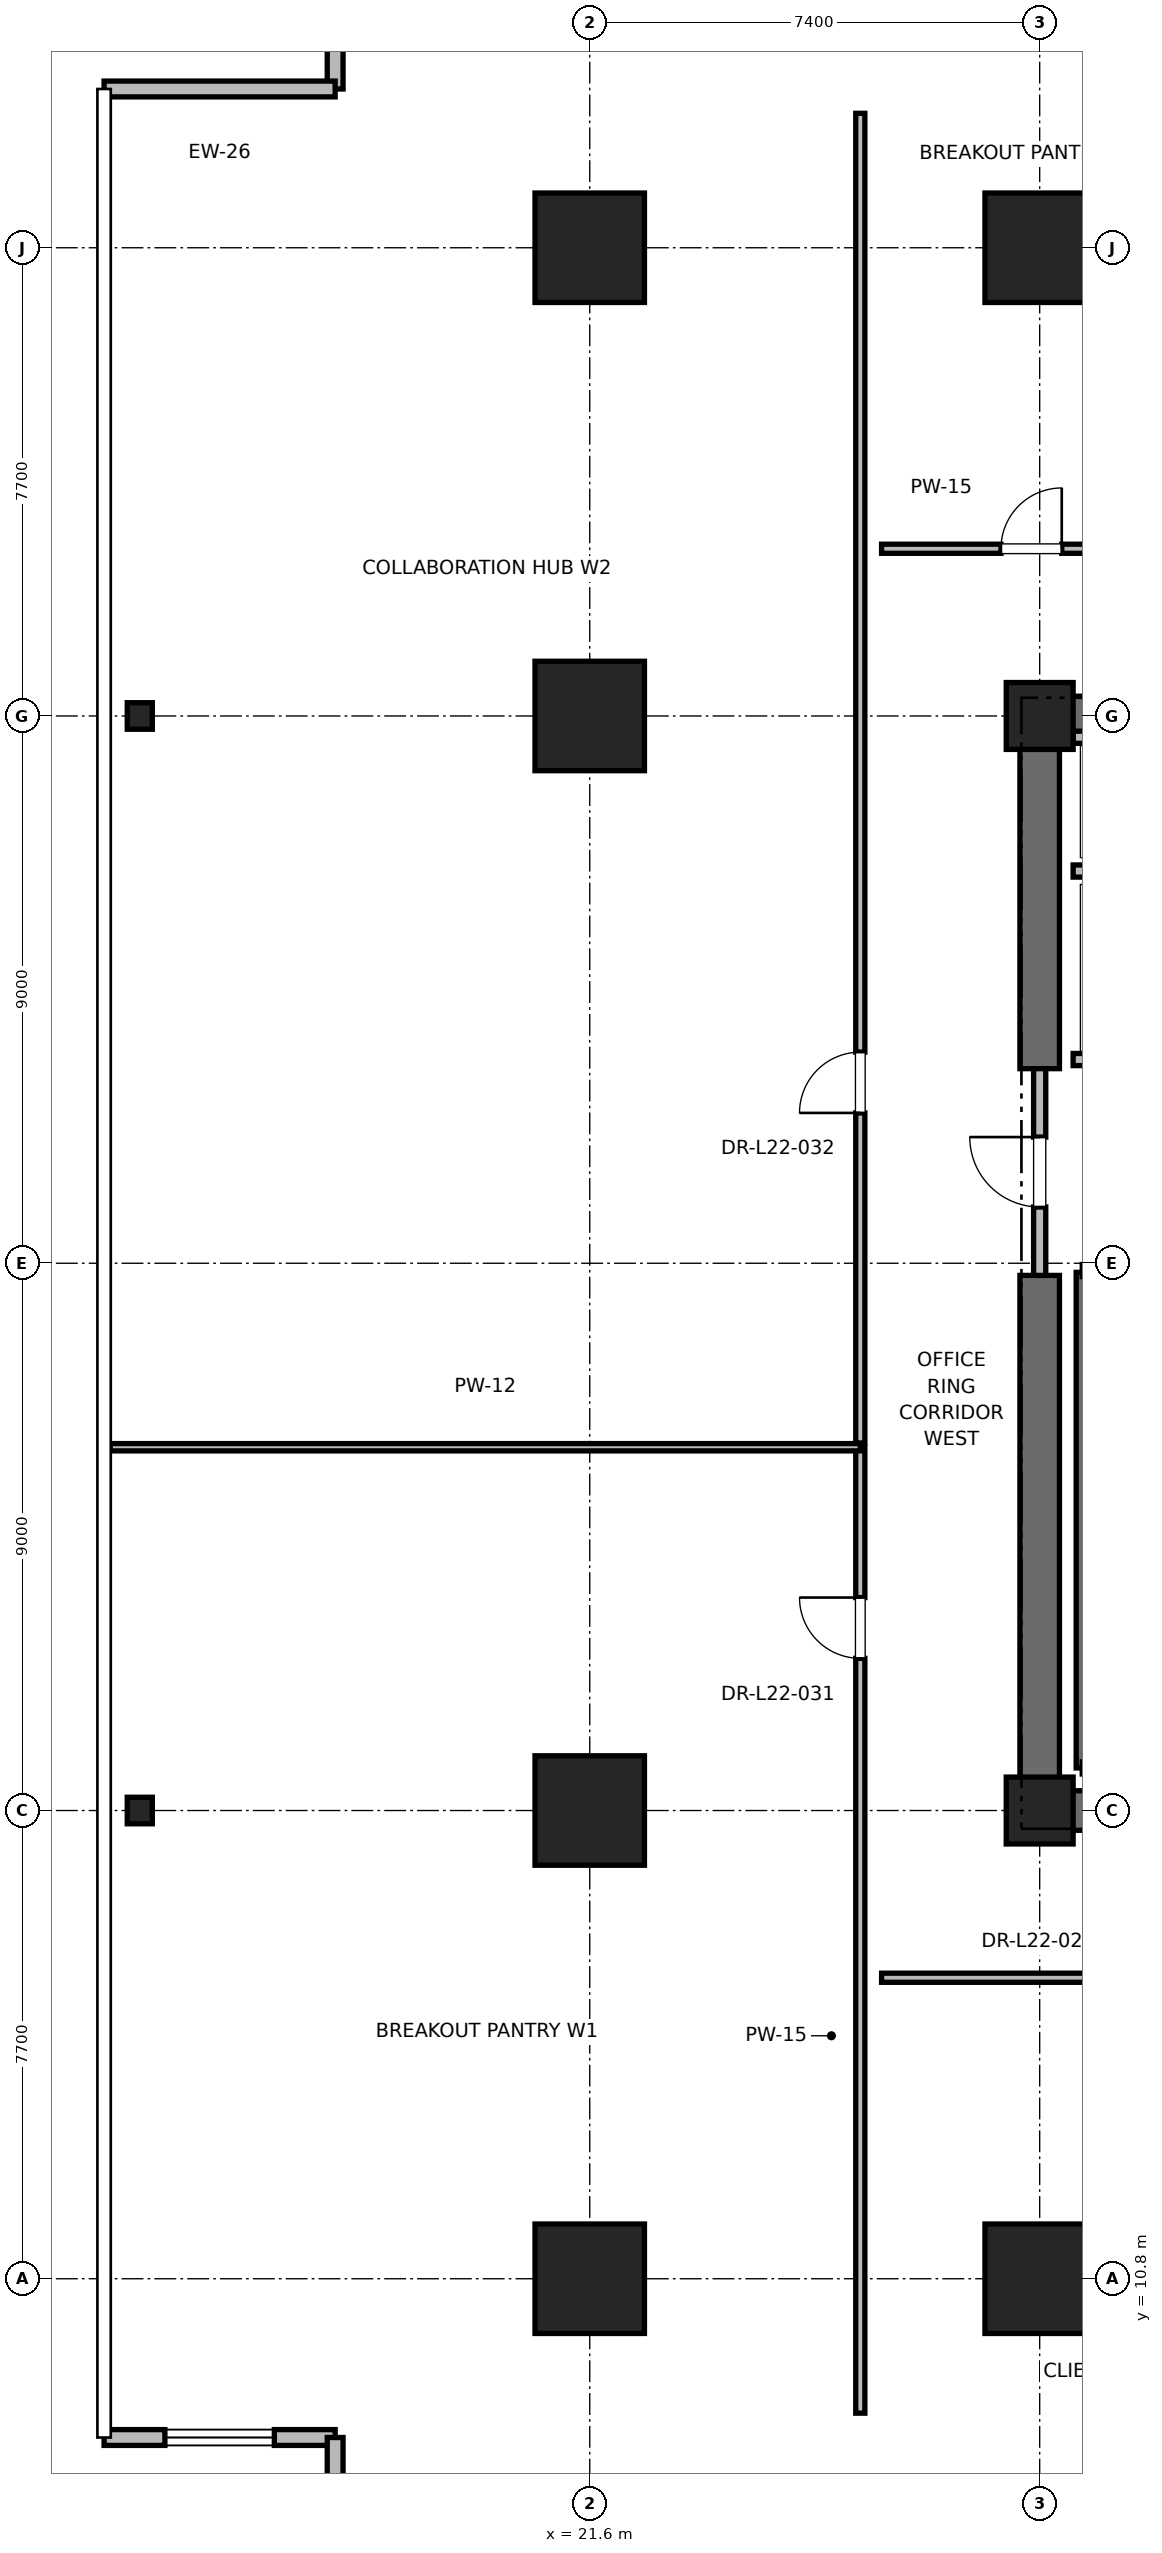
"""IFC4 building model, lengths in metres.
Left out: names, types, materials, properties, quantities, classifications, styles, units other than length and angle.
Written with IfcOpenShell. Run it as: python <this file> out.ifc"""

import sys

from ifc_helpers import new_model, si_unit, direction, frame, frame_2d, origin, origin_2d, place, context, subcontext, project, spatial, rectangle, i_section, extrude, element, fill, save


model = new_model("IFC4")
c1 = context("Model", 3, precision=1e-05, world=origin(), true_north=direction((0.0, 1.0)))
c2 = subcontext(c1, "Body", "Model", "MODEL_VIEW")
j1 = project(units=[si_unit("LENGTHUNIT", "METRE"), si_unit("PLANEANGLEUNIT", "RADIAN")], contexts=[c1])
p1 = place(None, origin())
s1 = spatial("IfcSite", under=j1, at=p1, CompositionType="ELEMENT")
p2 = place(p1, origin())
s2 = spatial("IfcBuilding", under=s1, at=p2, CompositionType="ELEMENT")
p3 = place(p2, frame((0.0, 0.0, 95.6)))
s3 = spatial("IfcBuildingStorey", under=s2, at=p3, CompositionType="ELEMENT", Elevation=95.6)
for number, where, z_axis, x_axis in (
    (1, (29.0, 10.8, 0.0), (0.0, 0.0, 1.0), (1.0, 0.0, 0.0)),
    (2, (29.0, 44.2, 0.0), (0.0, 0.0, 1.0), (1.0, 0.0, 0.0)),
    (3, (21.6, 18.5, 0.0), (0.0, 0.0, 1.0), (1.0, 0.0, 0.0)),
    (4, (21.6, 36.5, 0.0), (0.0, 0.0, 1.0), (1.0, 0.0, 0.0)),
    (5, (21.6, 10.8, 0.0), (0.0, 0.0, 1.0), (1.0, 0.0, 0.0)),
    (6, (21.6, 44.2, 0.0), (0.0, 0.0, 1.0), (1.0, 0.0, 0.0)),
):
    element("IfcColumn", number, at=place(p3, frame(where, z_axis=z_axis, x_axis=x_axis)), inside=s3, PredefinedType="COLUMN", context=c2, shape_type="SweptSolid", body=[
        extrude(rectangle(XDim=1.8, YDim=1.8, at=origin_2d()), origin(), (0.0, 0.0, 1.0), 4.0),
    ])
for number, where, z_axis, x_axis in (
    (7, (14.2, 18.5, 0.0), (0.0, 0.0, 1.0), (1.0, 0.0, 0.0)),
    (8, (14.2, 36.5, 0.0), (0.0, 0.0, 1.0), (1.0, 0.0, 0.0)),
):
    element("IfcColumn", number, at=place(p3, frame(where, z_axis=z_axis, x_axis=x_axis)), inside=s3, PredefinedType="COLUMN", context=c2, shape_type="SweptSolid", body=[
        extrude(i_section(OverallWidth=0.412, OverallDepth=0.437, WebThickness=0.036, FlangeThickness=0.058, FilletRadius=0.015, at=origin_2d()), origin(), (0.0, 0.0, 1.0), 4.0),
    ])
for number, where, z_axis, x_axis in (
    (9, (29.0, 18.5, 0.0), (0.0, 0.0, 1.0), (1.0, 0.0, 0.0)),
    (10, (29.0, 36.5, 0.0), (0.0, 0.0, 1.0), (1.0, 0.0, 0.0)),
):
    element("IfcColumn", number, at=place(p3, frame(where, z_axis=z_axis, x_axis=x_axis)), inside=s3, PredefinedType="PILASTER", context=c2, shape_type="SweptSolid", body=[
        extrude(rectangle(XDim=1.1, YDim=1.1, at=origin_2d()), origin(), (0.0, 0.0, 1.0), 4.0),
    ])
p4 = place(p3, frame((29.0, 18.5, 0.0), z_axis=(0.0, 0.0, 1.0), x_axis=(1.0, 0.0, 0.0)))
e11 = element("IfcWall", 11, at=p4, inside=s3, PredefinedType="SHEAR", context=c2, shape_type="SweptSolid", body=[
    extrude(rectangle(XDim=9.2, YDim=0.65, at=frame_2d((4.6, 0.0))), origin(), (0.0, 0.0, 1.0), 3.76),
])
p5 = place(p3, frame((29.0, 36.5, 0.0), z_axis=(0.0, 0.0, 1.0), x_axis=(1.0, 0.0, 0.0)))
e12 = element("IfcWall", 12, at=p5, inside=s3, PredefinedType="SHEAR", context=c2, shape_type="SweptSolid", body=[
    extrude(rectangle(XDim=5.8, YDim=0.65, at=frame_2d((2.9, 0.0))), origin(), (0.0, 0.0, 1.0), 3.76),
])
p6 = place(p3, frame((29.0, 18.5, 0.0), z_axis=(0.0, 0.0, 1.0), x_axis=(0.0, 1.0, 0.0)))
e13 = element("IfcWall", 13, at=p6, inside=s3, PredefinedType="SHEAR", context=c2, shape_type="SweptSolid", body=[
    extrude(rectangle(XDim=8.8, YDim=0.65, at=frame_2d((4.4, 0.0))), origin(), (0.0, 0.0, 1.0), 3.76),
])
p7 = place(p3, frame((29.0, 30.7, 0.0), z_axis=(0.0, 0.0, 1.0), x_axis=(0.0, 1.0, 0.0)))
e14 = element("IfcWall", 14, at=p7, inside=s3, PredefinedType="SHEAR", context=c2, shape_type="SweptSolid", body=[
    extrude(rectangle(XDim=5.8, YDim=0.65, at=frame_2d((2.9, 0.0))), origin(), (0.0, 0.0, 1.0), 3.76),
])
p8 = place(p3, frame((13.613, 8.189, 0.0), z_axis=(0.0, 0.0, 1.0), x_axis=(1.0, 0.0, 0.0)))
e15 = element("IfcWall", 15, at=p8, inside=s3, PredefinedType="PARAPET", context=c2, shape_type="SweptSolid", body=[
    extrude(rectangle(XDim=3.8, YDim=0.26, at=frame_2d((1.9, 0.0))), origin(), (0.0, 0.0, 1.0), 3.76),
])
p9 = place(p8, frame((1.0, 0.0, 0.85)))
e16 = element("IfcOpeningElement", 16, at=p9, cuts=e15, PredefinedType="OPENING", context=c2, shape_type="SweptSolid", body=[
    extrude(rectangle(XDim=1.8, YDim=2.2, at=frame_2d((0.9, 1.1))), frame((0.0, 0.13, 0.0), z_axis=(0.0, -1.0, 0.0), x_axis=(1.0, 0.0, 0.0)), (0.0, 0.0, 1.0), 0.26),
])
p10 = place(p3, frame((17.413, 8.189, 0.0), z_axis=(0.0, 0.0, 1.0), x_axis=(0.0, -1.0, 0.0)))
e17 = element("IfcWall", 17, at=p10, inside=s3, PredefinedType="PARAPET", context=c2, shape_type="SweptSolid", body=[
    extrude(rectangle(XDim=3.4, YDim=0.26, at=frame_2d((1.7, 0.0))), origin(), (0.0, 0.0, 1.0), 3.76),
])
p11 = place(p3, frame((17.413, 50.211, 0.0), z_axis=(0.0, 0.0, 1.0), x_axis=(0.0, -1.0, 0.0)))
e18 = element("IfcWall", 18, at=p11, inside=s3, PredefinedType="PARAPET", context=c2, shape_type="SweptSolid", body=[
    extrude(rectangle(XDim=3.4, YDim=0.26, at=frame_2d((1.7, 0.0))), origin(), (0.0, 0.0, 1.0), 3.76),
])
p12 = place(p11, frame((0.8, 0.0, 0.85)))
e19 = element("IfcOpeningElement", 19, at=p12, cuts=e18, PredefinedType="OPENING", context=c2, shape_type="SweptSolid", body=[
    extrude(rectangle(XDim=1.8, YDim=2.2, at=frame_2d((0.9, 1.1))), frame((0.0, 0.13, 0.0), z_axis=(0.0, -1.0, 0.0), x_axis=(1.0, 0.0, 0.0)), (0.0, 0.0, 1.0), 0.26),
])
p13 = place(p3, frame((17.413, 46.811, 0.0), z_axis=(0.0, 0.0, 1.0), x_axis=(-1.0, 0.0, 0.0)))
e20 = element("IfcWall", 20, at=p13, inside=s3, PredefinedType="PARAPET", context=c2, shape_type="SweptSolid", body=[
    extrude(rectangle(XDim=3.8, YDim=0.26, at=frame_2d((1.9, 0.0))), origin(), (0.0, 0.0, 1.0), 3.76),
])
p14 = place(p3, frame((29.7, 19.2, 0.0), z_axis=(0.0, 0.0, 1.0), x_axis=(0.0, 1.0, 0.0)))
e21 = element("IfcWall", 21, at=p14, inside=s3, PredefinedType="SOLIDWALL", context=c2, shape_type="SweptSolid", body=[
    extrude(rectangle(XDim=8.15, YDim=0.2, at=frame_2d((4.075, 0.0))), origin(), (0.0, 0.0, 1.0), 3.76),
])
p15 = place(p3, frame((29.0, 27.3, 0.0), z_axis=(0.0, 0.0, 1.0), x_axis=(0.0, 1.0, 0.0)))
e22 = element("IfcWall", 22, at=p15, inside=s3, PredefinedType="PARTITIONING", context=c2, shape_type="SweptSolid", body=[
    extrude(rectangle(XDim=3.4, YDim=0.2, at=frame_2d((1.7, 0.0))), origin(), (0.0, 0.0, 1.0), 2.54),
])
p16 = place(p15, frame((1.125, 0.0, 0.0)))
e23 = element("IfcOpeningElement", 23, at=p16, cuts=e22, PredefinedType="OPENING", context=c2, shape_type="SweptSolid", body=[
    extrude(rectangle(XDim=1.15, YDim=2.2, at=frame_2d((0.575, 1.1))), frame((0.0, 0.1, 0.0), z_axis=(0.0, -1.0, 0.0), x_axis=(1.0, 0.0, 0.0)), (0.0, 0.0, 1.0), 0.2),
])
p17 = place(p3, frame((29.55, 30.85, 0.0), z_axis=(0.0, 0.0, 1.0), x_axis=(1.0, 0.0, 0.0)))
e24 = element("IfcWall", 24, at=p17, inside=s3, PredefinedType="SOLIDWALL", context=c2, shape_type="SweptSolid", body=[
    extrude(rectangle(XDim=2.6, YDim=0.2, at=frame_2d((1.3, 0.0))), origin(), (0.0, 0.0, 1.0), 2.54),
])
p18 = place(p17, frame((0.75, 0.0, 0.0)))
e25 = element("IfcOpeningElement", 25, at=p18, cuts=e24, PredefinedType="OPENING", context=c2, shape_type="SweptSolid", body=[
    extrude(rectangle(XDim=1.1, YDim=2.2, at=frame_2d((0.55, 1.1))), frame((0.0, 0.1, 0.0), z_axis=(0.0, -1.0, 0.0), x_axis=(1.0, 0.0, 0.0)), (0.0, 0.0, 1.0), 0.2),
])
p19 = place(p3, frame((29.55, 33.95, 0.0), z_axis=(0.0, 0.0, 1.0), x_axis=(1.0, 0.0, 0.0)))
e26 = element("IfcWall", 26, at=p19, inside=s3, PredefinedType="SOLIDWALL", context=c2, shape_type="SweptSolid", body=[
    extrude(rectangle(XDim=2.8, YDim=0.2, at=frame_2d((1.4, 0.0))), origin(), (0.0, 0.0, 1.0), 3.76),
])
p20 = place(p3, frame((32.35, 36.15, 0.0), z_axis=(0.0, 0.0, 1.0), x_axis=(-1.0, 0.0, 0.0)))
e27 = element("IfcWall", 27, at=p20, inside=s3, PredefinedType="SOLIDWALL", context=c2, shape_type="SweptSolid", body=[
    extrude(rectangle(XDim=2.8, YDim=0.2, at=frame_2d((1.4, 0.0))), origin(), (0.0, 0.0, 1.0), 2.889),
])
p21 = place(p3, frame((26.4, 39.25, 0.0), z_axis=(0.0, 0.0, 1.0), x_axis=(1.0, 0.0, 0.0)))
e28 = element("IfcWall", 28, at=p21, inside=s3, PredefinedType="PARTITIONING", context=c2, shape_type="SweptSolid", body=[
    extrude(rectangle(XDim=4.896, YDim=0.15, at=frame_2d((2.448, 0.0))), origin(), (0.0, 0.0, 1.0), 2.85),
])
p22 = place(p21, frame((1.963, 0.0, 0.0)))
e29 = element("IfcOpeningElement", 29, at=p22, cuts=e28, PredefinedType="OPENING", context=c2, shape_type="SweptSolid", body=[
    extrude(rectangle(XDim=1.0, YDim=2.15, at=frame_2d((0.5, 1.075))), frame((0.0, 0.075, 0.0), z_axis=(0.0, -1.0, 0.0), x_axis=(1.0, 0.0, 0.0)), (0.0, 0.0, 1.0), 0.15),
])
p23 = place(p3, frame((26.4, 15.75, 0.0), z_axis=(0.0, 0.0, 1.0), x_axis=(1.0, 0.0, 0.0)))
e30 = element("IfcWall", 30, at=p23, inside=s3, PredefinedType="PARTITIONING", context=c2, shape_type="SweptSolid", body=[
    extrude(rectangle(XDim=9.248, YDim=0.15, at=frame_2d((4.624, 0.0))), origin(), (0.0, 0.0, 1.0), 2.85),
])
p24 = place(p23, frame((3.889, 0.0, 0.0)))
e31 = element("IfcOpeningElement", 31, at=p24, cuts=e30, PredefinedType="OPENING", context=c2, shape_type="SweptSolid", body=[
    extrude(rectangle(XDim=1.5, YDim=2.25, at=frame_2d((0.75, 1.125))), frame((0.0, 0.075, 0.0), z_axis=(0.0, -1.0, 0.0), x_axis=(1.0, 0.0, 0.0)), (0.0, 0.0, 1.0), 0.15),
])
p25 = place(p3, frame((26.05, 8.589, 0.0), z_axis=(0.0, 0.0, 1.0), x_axis=(0.0, 1.0, 0.0)))
e32 = element("IfcWall", 32, at=p25, inside=s3, PredefinedType="PARTITIONING", context=c2, shape_type="SweptSolid", body=[
    extrude(rectangle(XDim=15.885, YDim=0.15, at=frame_2d((7.943, 0.0))), origin(), (0.0, 0.0, 1.0), 2.85),
])
p26 = place(p25, frame((12.413, 0.0, 0.0)))
e33 = element("IfcOpeningElement", 33, at=p26, cuts=e32, PredefinedType="OPENING", context=c2, shape_type="SweptSolid", body=[
    extrude(rectangle(XDim=1.0, YDim=2.15, at=frame_2d((0.5, 1.075))), frame((0.0, 0.075, 0.0), z_axis=(0.0, -1.0, 0.0), x_axis=(1.0, 0.0, 0.0)), (0.0, 0.0, 1.0), 0.15),
])
p27 = place(p3, frame((13.713, 24.474, 0.0), z_axis=(0.0, 0.0, 1.0), x_axis=(1.0, 0.0, 0.0)))
e34 = element("IfcWall", 34, at=p27, inside=s3, PredefinedType="PARTITIONING", context=c2, shape_type="SweptSolid", body=[
    extrude(rectangle(XDim=12.337, YDim=0.12, at=frame_2d((6.168, 0.0))), origin(), (0.0, 0.0, 1.0), 2.85),
])
p28 = place(p3, frame((26.05, 24.544, 0.0), z_axis=(0.0, 0.0, 1.0), x_axis=(0.0, 1.0, 0.0)))
e35 = element("IfcWall", 35, at=p28, inside=s3, PredefinedType="PARTITIONING", context=c2, shape_type="SweptSolid", body=[
    extrude(rectangle(XDim=21.867, YDim=0.15, at=frame_2d((10.933, 0.0))), origin(), (0.0, 0.0, 1.0), 2.85),
])
p29 = place(p28, frame((5.428, 0.0, 0.0)))
e36 = element("IfcOpeningElement", 36, at=p29, cuts=e35, PredefinedType="OPENING", context=c2, shape_type="SweptSolid", body=[
    extrude(rectangle(XDim=1.0, YDim=2.15, at=frame_2d((0.5, 1.075))), frame((0.0, 0.075, 0.0), z_axis=(0.0, -1.0, 0.0), x_axis=(1.0, 0.0, 0.0)), (0.0, 0.0, 1.0), 0.15),
])
p30 = place(p9, origin())
e37 = element("IfcWindow", 37, at=p30, inside=s3, PartitioningType="SINGLE_PANEL", PredefinedType="WINDOW", context=c2, shape_type="SweptSolid", body=[
    extrude(rectangle(XDim=1.8, YDim=2.2, at=frame_2d((0.9, 1.1))), frame((0.0, 0.03, 0.0), z_axis=(0.0, -1.0, 0.0), x_axis=(1.0, 0.0, 0.0)), (0.0, 0.0, 1.0), 0.06),
])
fill(e16, e37)
p31 = place(p16, origin())
e38 = element("IfcDoor", 38, at=p31, inside=s3, OperationType="SINGLE_SWING_RIGHT", PredefinedType="DOOR", context=c2, shape_type="SweptSolid", body=[
    extrude(rectangle(XDim=1.15, YDim=2.2, at=frame_2d((0.575, 1.1))), frame((0.0, 0.025, 0.0), z_axis=(0.0, -1.0, 0.0), x_axis=(1.0, 0.0, 0.0)), (0.0, 0.0, 1.0), 0.05),
])
fill(e23, e38)
p32 = place(p22, origin())
e39 = element("IfcDoor", 39, at=p32, inside=s3, OperationType="SINGLE_SWING_RIGHT", PredefinedType="DOOR", context=c2, shape_type="SweptSolid", body=[
    extrude(rectangle(XDim=1.0, YDim=2.15, at=frame_2d((0.5, 1.075))), frame((0.0, 0.025, 0.0), z_axis=(0.0, -1.0, 0.0), x_axis=(1.0, 0.0, 0.0)), (0.0, 0.0, 1.0), 0.05),
])
fill(e29, e39)
p33 = place(p26, origin())
e40 = element("IfcDoor", 40, at=p33, inside=s3, OperationType="SINGLE_SWING_RIGHT", PredefinedType="DOOR", context=c2, shape_type="SweptSolid", body=[
    extrude(rectangle(XDim=1.0, YDim=2.15, at=frame_2d((0.5, 1.075))), frame((0.0, 0.025, 0.0), z_axis=(0.0, -1.0, 0.0), x_axis=(1.0, 0.0, 0.0)), (0.0, 0.0, 1.0), 0.05),
])
fill(e33, e40)
p34 = place(p29, origin())
e41 = element("IfcDoor", 41, at=p34, inside=s3, OperationType="SINGLE_SWING_LEFT", PredefinedType="DOOR", context=c2, shape_type="SweptSolid", body=[
    extrude(rectangle(XDim=1.0, YDim=2.15, at=frame_2d((0.5, 1.075))), frame((0.0, 0.025, 0.0), z_axis=(0.0, -1.0, 0.0), x_axis=(1.0, 0.0, 0.0)), (0.0, 0.0, 1.0), 0.05),
])
fill(e36, e41)
save(model, sys.argv[1])
